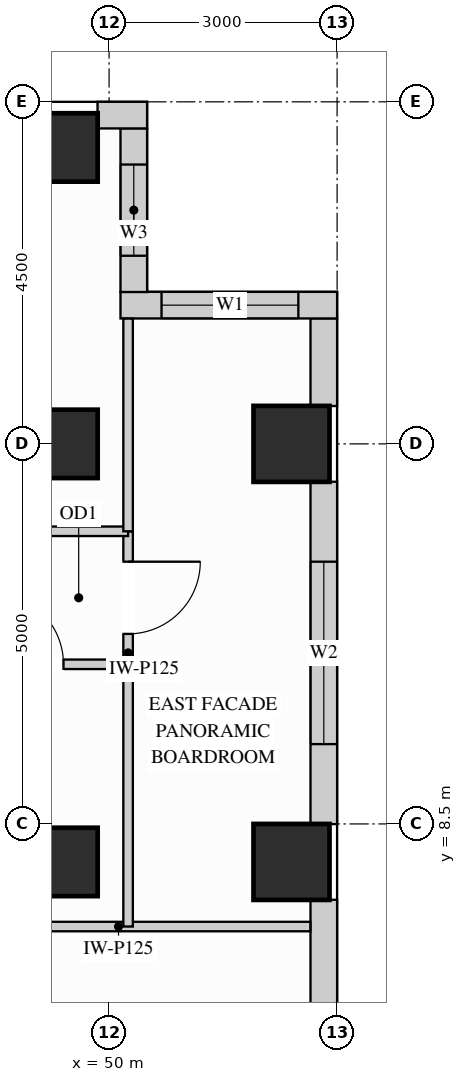
"""IFC4 building model, lengths in metres.
Left out: names, types, materials, properties, quantities, classifications, styles, units other than length and angle.
Written with IfcOpenShell. Run it as: python <this file> out.ifc"""

import sys

from ifc_helpers import new_model, si_unit, direction, frame, frame_2d, origin, origin_2d, place, context, subcontext, project, spatial, rectangle, extrude, source, transform, mapped, element, fill, save


model = new_model("IFC4")
c1 = context("Model", 3, precision=1e-05, world=origin(), true_north=direction((0.0, 1.0)))
c2 = subcontext(c1, "Body", "Model", "MODEL_VIEW")
j1 = project(units=[si_unit("LENGTHUNIT", "METRE"), si_unit("PLANEANGLEUNIT", "RADIAN")], contexts=[c1])
p1 = place(None, origin())
s1 = spatial("IfcSite", under=j1, at=p1, CompositionType="ELEMENT")
p2 = place(p1, origin())
s2 = spatial("IfcBuilding", under=s1, at=p2, CompositionType="ELEMENT")
p3 = place(p2, frame((0.0, 0.0, 171.9)))
s3 = spatial("IfcBuildingStorey", under=s2, at=p3, CompositionType="ELEMENT", Elevation=171.9)
m1 = source(origin(), c2, "Body", "SweptSolid", [
    extrude(rectangle(XDim=0.9, YDim=0.9, at=origin_2d()), origin(), (0.0, 0.0, 1.0), 3.4),
])
for number, where, z_axis, x_axis in (
    (1, (49.4, 13.5, 0.0), (0.0, 0.0, 1.0), (1.0, 0.0, 0.0)),
    (2, (49.4, 17.4, 0.0), (0.0, 0.0, 1.0), (1.0, 0.0, 0.0)),
    (3, (49.4, 8.0, 0.0), (0.0, 0.0, 1.0), (1.0, 0.0, 0.0)),
):
    element("IfcColumn", number, at=place(p3, frame(where, z_axis=z_axis, x_axis=x_axis)), inside=s3, PredefinedType="COLUMN", context=c2, shape_type="MappedRepresentation", body=[
        mapped(m1, transform((0.0, 0.0, 0.0), x_axis=(1.0, 0.0, 0.0), y_axis=(0.0, 1.0, 0.0), z_axis=(0.0, 0.0, 1.0))),
    ])
m2 = source(origin(), c2, "Body", "SweptSolid", [
    extrude(rectangle(XDim=1.0, YDim=1.0, at=origin_2d()), origin(), (0.0, 0.0, 1.0), 3.4),
])
for number, where, z_axis, x_axis in (
    (4, (52.4, 13.5, 0.0), (0.0, 0.0, 1.0), (1.0, 0.0, 0.0)),
    (5, (52.4, 8.0, 0.0), (0.0, 0.0, 1.0), (1.0, 0.0, 0.0)),
):
    element("IfcColumn", number, at=place(p3, frame(where, z_axis=z_axis, x_axis=x_axis)), inside=s3, PredefinedType="COLUMN", context=c2, shape_type="MappedRepresentation", body=[
        mapped(m2, transform((0.0, 0.0, 0.0), x_axis=(1.0, 0.0, 0.0), y_axis=(0.0, 1.0, 0.0), z_axis=(0.0, 0.0, 1.0))),
    ])
m3 = source(origin(), c2, "Body", "SweptSolid", [
    extrude(rectangle(XDim=3.504, YDim=0.35, at=frame_2d((1.752, 0.0))), origin(), (0.0, 0.0, 1.0), 2.612),
])
p4 = place(p3, frame((52.825, 3.998, 0.0), z_axis=(0.0, 0.0, 1.0), x_axis=(0.0, 1.0, 0.0)))
e6 = element("IfcWall", 6, at=p4, inside=s3, PredefinedType="SOLIDWALL", context=c2, shape_type="MappedRepresentation", body=[
    mapped(m3, transform((0.0, 0.0, 0.0), x_axis=(1.0, 0.0, 0.0), y_axis=(0.0, 1.0, 0.0), z_axis=(0.0, 0.0, 1.0))),
])
p5 = place(p3, frame((52.825, 8.498, 0.0), z_axis=(0.0, 0.0, 1.0), x_axis=(0.0, 1.0, 0.0)))
e7 = element("IfcWall", 7, at=p5, inside=s3, PredefinedType="SOLIDWALL", context=c2, shape_type="SweptSolid", body=[
    extrude(rectangle(XDim=4.504, YDim=0.35, at=frame_2d((2.252, 0.0))), origin(), (0.0, 0.0, 1.0), 2.612),
])
p6 = place(p5, frame((1.052, 0.0, 0.78)))
e8 = element("IfcOpeningElement", 8, at=p6, cuts=e7, PredefinedType="OPENING", context=c2, shape_type="SweptSolid", body=[
    extrude(rectangle(XDim=2.4, YDim=1.652, at=frame_2d((1.2, 0.826))), frame((0.0, 0.185, 0.0), z_axis=(0.0, -1.0, 0.0), x_axis=(1.0, 0.0, 0.0)), (0.0, 0.0, 1.0), 0.37),
])
m4 = source(origin(), c2, "Body", "SweptSolid", [
    extrude(rectangle(XDim=1.154, YDim=0.35, at=frame_2d((0.577, 0.0))), origin(), (0.0, 0.0, 1.0), 3.385),
])
p7 = place(p3, frame((52.825, 13.998, 0.0), z_axis=(0.0, 0.0, 1.0), x_axis=(0.0, 1.0, 0.0)))
e9 = element("IfcWall", 9, at=p7, inside=s3, PredefinedType="SOLIDWALL", context=c2, shape_type="MappedRepresentation", body=[
    mapped(m4, transform((0.0, 0.0, 0.0), x_axis=(1.0, 0.0, 0.0), y_axis=(0.0, 1.0, 0.0), z_axis=(0.0, 0.0, 1.0))),
])
p8 = place(p3, frame((53.0, 15.325, 0.0), z_axis=(0.0, 0.0, 1.0), x_axis=(-1.0, 0.0, 0.0)))
e10 = element("IfcWall", 10, at=p8, inside=s3, PredefinedType="SOLIDWALL", context=c2, shape_type="SweptSolid", body=[
    extrude(rectangle(XDim=2.85, YDim=0.35, at=frame_2d((1.425, 0.0))), origin(), (0.0, 0.0, 1.0), 3.385),
])
p9 = place(p8, frame((0.51, 0.0, 0.78)))
e11 = element("IfcOpeningElement", 11, at=p9, cuts=e10, PredefinedType="OPENING", context=c2, shape_type="SweptSolid", body=[
    extrude(rectangle(XDim=1.8, YDim=2.1, at=frame_2d((0.9, 1.05))), frame((0.0, 0.185, 0.0), z_axis=(0.0, -1.0, 0.0), x_axis=(1.0, 0.0, 0.0)), (0.0, 0.0, 1.0), 0.37),
])
p10 = place(p3, frame((50.325, 15.498, 0.0), z_axis=(0.0, 0.0, 1.0), x_axis=(0.0, 1.0, 0.0)))
e12 = element("IfcWall", 12, at=p10, inside=s3, PredefinedType="SOLIDWALL", context=c2, shape_type="SweptSolid", body=[
    extrude(rectangle(XDim=2.154, YDim=0.35, at=frame_2d((1.077, 0.0))), origin(), (0.0, 0.0, 1.0), 3.385),
])
p11 = place(p10, frame((0.477, 0.0, 0.78)))
e13 = element("IfcOpeningElement", 13, at=p11, cuts=e12, PredefinedType="OPENING", context=c2, shape_type="SweptSolid", body=[
    extrude(rectangle(XDim=1.2, YDim=2.1, at=frame_2d((0.6, 1.05))), frame((0.0, 0.185, 0.0), z_axis=(0.0, -1.0, 0.0), x_axis=(1.0, 0.0, 0.0)), (0.0, 0.0, 1.0), 0.37),
])
m5 = source(origin(), c2, "Body", "SweptSolid", [
    extrude(rectangle(XDim=0.652, YDim=0.35, at=frame_2d((0.326, 0.0))), origin(), (0.0, 0.0, 1.0), 3.385),
])
p12 = place(p3, frame((50.5, 17.825, 0.0), z_axis=(0.0, 0.0, 1.0), x_axis=(-1.0, 0.0, 0.0)))
e14 = element("IfcWall", 14, at=p12, inside=s3, PredefinedType="SOLIDWALL", context=c2, shape_type="MappedRepresentation", body=[
    mapped(m5, transform((0.0, 0.0, 0.0), x_axis=(1.0, 0.0, 0.0), y_axis=(0.0, 1.0, 0.0), z_axis=(0.0, 0.0, 1.0))),
])
p13 = place(p3, frame((50.25, 10.6, 0.0), z_axis=(0.0, 0.0, 1.0), x_axis=(0.0, 1.0, 0.0)))
e15 = element("IfcWall", 15, at=p13, inside=s3, PredefinedType="PARTITIONING", context=c2, shape_type="SweptSolid", body=[
    extrude(rectangle(XDim=1.75, YDim=0.125, at=frame_2d((0.875, 0.0))), origin(), (0.0, 0.0, 1.0), 3.385),
])
p14 = place(p13, frame((0.4, 0.0, 0.0)))
e16 = element("IfcOpeningElement", 16, at=p14, cuts=e15, PredefinedType="OPENING", context=c2, shape_type="SweptSolid", body=[
    extrude(rectangle(XDim=0.95, YDim=2.15, at=frame_2d((0.475, 1.075))), frame((0.0, 0.073, 0.0), z_axis=(0.0, -1.0, 0.0), x_axis=(1.0, 0.0, 0.0)), (0.0, 0.0, 1.0), 0.145),
])
m6 = source(origin(), c2, "Body", "SweptSolid", [
    extrude(rectangle(XDim=5.048, YDim=0.125, at=frame_2d((2.524, 0.0))), origin(), (0.0, 0.0, 1.0), 3.385),
])
p15 = place(p3, frame((47.6, 7.15, 0.0), z_axis=(0.0, 0.0, 1.0), x_axis=(1.0, 0.0, 0.0)))
e17 = element("IfcWall", 17, at=p15, inside=s3, PredefinedType="PARTITIONING", context=c2, shape_type="MappedRepresentation", body=[
    mapped(m6, transform((0.0, 0.0, 0.0), x_axis=(1.0, 0.0, 0.0), y_axis=(0.0, 1.0, 0.0), z_axis=(0.0, 0.0, 1.0))),
])
m7 = source(origin(), c2, "Body", "SweptSolid", [
    extrude(rectangle(XDim=2.65, YDim=0.125, at=frame_2d((1.325, 0.0))), origin(), (0.0, 0.0, 1.0), 3.385),
])
p16 = place(p3, frame((47.6, 12.35, 0.0), z_axis=(0.0, 0.0, 1.0), x_axis=(1.0, 0.0, 0.0)))
e18 = element("IfcWall", 18, at=p16, inside=s3, PredefinedType="PARTITIONING", context=c2, shape_type="MappedRepresentation", body=[
    mapped(m7, transform((0.0, 0.0, 0.0), x_axis=(1.0, 0.0, 0.0), y_axis=(0.0, 1.0, 0.0), z_axis=(0.0, 0.0, 1.0))),
])
p17 = place(p3, frame((47.6, 10.6, 0.0), z_axis=(0.0, 0.0, 1.0), x_axis=(1.0, 0.0, 0.0)))
e19 = element("IfcWall", 19, at=p17, inside=s3, PredefinedType="PARTITIONING", context=c2, shape_type="SweptSolid", body=[
    extrude(rectangle(XDim=2.65, YDim=0.125, at=frame_2d((1.325, 0.0))), origin(), (0.0, 0.0, 1.0), 2.773),
])
p18 = place(p17, frame((0.85, 0.0, 0.0)))
e20 = element("IfcOpeningElement", 20, at=p18, cuts=e19, PredefinedType="OPENING", context=c2, shape_type="SweptSolid", body=[
    extrude(rectangle(XDim=0.95, YDim=2.15, at=frame_2d((0.475, 1.075))), frame((0.0, 0.073, 0.0), z_axis=(0.0, -1.0, 0.0), x_axis=(1.0, 0.0, 0.0)), (0.0, 0.0, 1.0), 0.145),
])
m8 = source(origin(), c2, "Body", "SweptSolid", [
    extrude(rectangle(XDim=3.45, YDim=0.125, at=frame_2d((1.725, 0.0))), origin(), (0.0, 0.0, 1.0), 3.385),
])
p19 = place(p3, frame((50.25, 7.15, 0.0), z_axis=(0.0, 0.0, 1.0), x_axis=(0.0, 1.0, 0.0)))
e21 = element("IfcWall", 21, at=p19, inside=s3, PredefinedType="PARTITIONING", context=c2, shape_type="MappedRepresentation", body=[
    mapped(m8, transform((0.0, 0.0, 0.0), x_axis=(1.0, 0.0, 0.0), y_axis=(0.0, 1.0, 0.0), z_axis=(0.0, 0.0, 1.0))),
])
m9 = source(origin(), c2, "Body", "SweptSolid", [
    extrude(rectangle(XDim=2.798, YDim=0.125, at=frame_2d((1.399, 0.0))), origin(), (0.0, 0.0, 1.0), 3.385),
])
p20 = place(p3, frame((50.25, 12.35, 0.0), z_axis=(0.0, 0.0, 1.0), x_axis=(0.0, 1.0, 0.0)))
e22 = element("IfcWall", 22, at=p20, inside=s3, PredefinedType="PARTITIONING", context=c2, shape_type="MappedRepresentation", body=[
    mapped(m9, transform((0.0, 0.0, 0.0), x_axis=(1.0, 0.0, 0.0), y_axis=(0.0, 1.0, 0.0), z_axis=(0.0, 0.0, 1.0))),
])
m10 = source(origin(), c2, "Body", "SweptSolid", [
    extrude(rectangle(XDim=0.95, YDim=2.15, at=frame_2d((0.475, 1.075))), frame((0.0, 0.025, 0.0), z_axis=(0.0, -1.0, 0.0), x_axis=(1.0, 0.0, 0.0)), (0.0, 0.0, 1.0), 0.05),
])
p21 = place(p18, origin())
e23 = element("IfcDoor", 23, at=p21, inside=s3, OperationType="SINGLE_SWING_LEFT", PredefinedType="DOOR", context=c2, shape_type="MappedRepresentation", body=[
    mapped(m10, transform((0.0, 0.0, 0.0), x_axis=(1.0, 0.0, 0.0), y_axis=(0.0, 1.0, 0.0), z_axis=(0.0, 0.0, 1.0))),
])
fill(e20, e23)
p22 = place(p14, origin())
e24 = element("IfcDoor", 24, at=p22, inside=s3, OperationType="SINGLE_SWING_RIGHT", PredefinedType="DOOR", context=c2, shape_type="MappedRepresentation", body=[
    mapped(m10, transform((0.0, 0.0, 0.0), x_axis=(1.0, 0.0, 0.0), y_axis=(0.0, 1.0, 0.0), z_axis=(0.0, 0.0, 1.0))),
])
fill(e16, e24)
m11 = source(origin(), c2, "Body", "SweptSolid", [
    extrude(rectangle(XDim=1.8, YDim=2.1, at=frame_2d((0.9, 1.05))), frame((0.0, 0.03, 0.0), z_axis=(0.0, -1.0, 0.0), x_axis=(1.0, 0.0, 0.0)), (0.0, 0.0, 1.0), 0.06),
])
p23 = place(p9, origin())
e25 = element("IfcWindow", 25, at=p23, inside=s3, PartitioningType="SINGLE_PANEL", PredefinedType="WINDOW", context=c2, shape_type="MappedRepresentation", body=[
    mapped(m11, transform((0.0, 0.0, 0.0), x_axis=(1.0, 0.0, 0.0), y_axis=(0.0, 1.0, 0.0), z_axis=(0.0, 0.0, 1.0))),
])
fill(e11, e25)
m12 = source(origin(), c2, "Body", "SweptSolid", [
    extrude(rectangle(XDim=2.4, YDim=1.652, at=frame_2d((1.2, 0.826))), frame((0.0, 0.03, 0.0), z_axis=(0.0, -1.0, 0.0), x_axis=(1.0, 0.0, 0.0)), (0.0, 0.0, 1.0), 0.06),
])
p24 = place(p6, origin())
e26 = element("IfcWindow", 26, at=p24, inside=s3, PartitioningType="SINGLE_PANEL", PredefinedType="WINDOW", context=c2, shape_type="MappedRepresentation", body=[
    mapped(m12, transform((0.0, 0.0, 0.0), x_axis=(1.0, 0.0, 0.0), y_axis=(0.0, 1.0, 0.0), z_axis=(0.0, 0.0, 1.0))),
])
fill(e8, e26)
m13 = source(origin(), c2, "Body", "SweptSolid", [
    extrude(rectangle(XDim=1.2, YDim=2.1, at=frame_2d((0.6, 1.05))), frame((0.0, 0.03, 0.0), z_axis=(0.0, -1.0, 0.0), x_axis=(1.0, 0.0, 0.0)), (0.0, 0.0, 1.0), 0.06),
])
p25 = place(p11, origin())
e27 = element("IfcWindow", 27, at=p25, inside=s3, PartitioningType="SINGLE_PANEL", PredefinedType="WINDOW", context=c2, shape_type="MappedRepresentation", body=[
    mapped(m13, transform((0.0, 0.0, 0.0), x_axis=(1.0, 0.0, 0.0), y_axis=(0.0, 1.0, 0.0), z_axis=(0.0, 0.0, 1.0))),
])
fill(e13, e27)
save(model, sys.argv[1])
